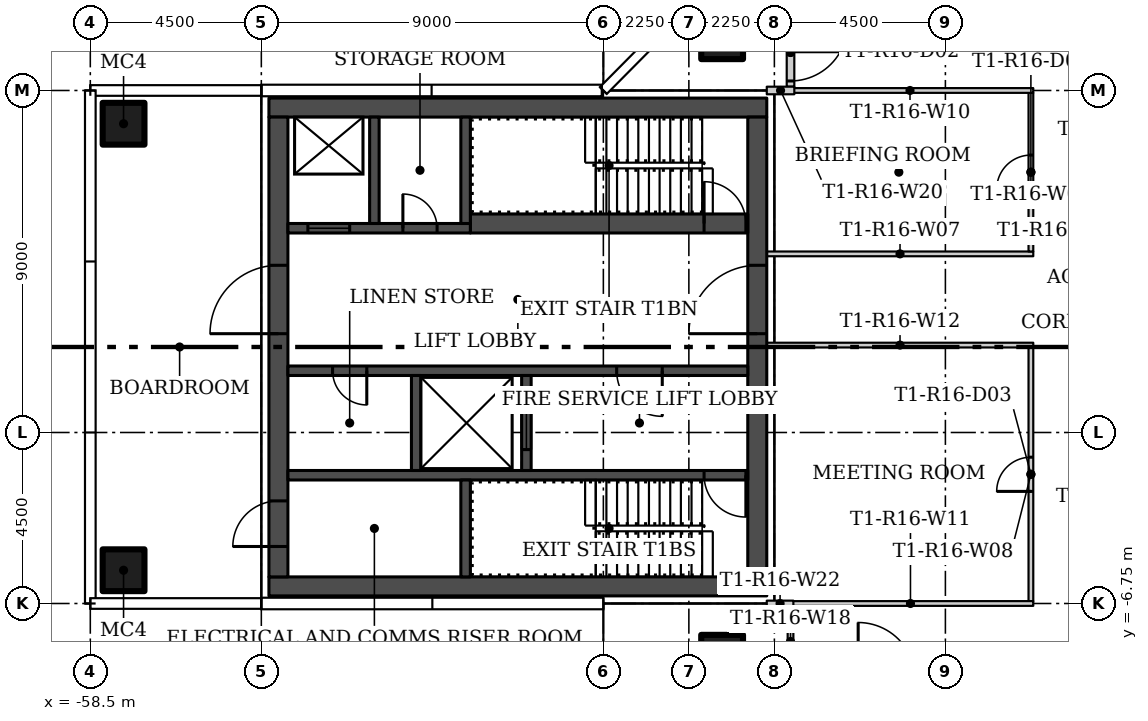
"""IFC4 building model, lengths in metres.
Left out: names, types, materials, properties, quantities, classifications, styles, units other than length and angle.
Written with IfcOpenShell. Run it as: python <this file> out.ifc"""

import sys

from ifc_helpers import new_model, si_unit, direction, frame, frame_2d, origin, origin_2d, place, context, subcontext, project, spatial, rectangle, hollow_rectangle, extrude, element, fill, save


model = new_model("IFC4")
c1 = context("Model", 3, precision=1e-05, world=origin(), true_north=direction((0.0, 1.0)))
c2 = subcontext(c1, "Body", "Model", "MODEL_VIEW")
j1 = project(units=[si_unit("LENGTHUNIT", "METRE"), si_unit("PLANEANGLEUNIT", "RADIAN")], contexts=[c1])
p1 = place(None, origin())
s1 = spatial("IfcSite", under=j1, at=p1, CompositionType="ELEMENT")
p2 = place(p1, origin())
s2 = spatial("IfcBuilding", under=s1, at=p2, CompositionType="ELEMENT")
p3 = place(p2, frame((0.0, 0.0, 146.7)))
s3 = spatial("IfcBuildingStorey", under=s2, at=p3, CompositionType="ELEMENT", Elevation=146.7)
for number, where in (
    (1, (-41.875, 8.125, 0.0)),
    (2, (-41.875, -8.125, 0.0)),
    (3, (-57.625, -5.875, 0.0)),
    (4, (-57.625, 5.875, 0.0)),
):
    element("IfcColumn", number, at=place(p3, frame(where)), inside=s3, PredefinedType="COLUMN", context=c2, shape_type="SweptSolid", body=[
        extrude(hollow_rectangle(XDim=1.1, YDim=1.1, WallThickness=0.04, at=origin_2d()), origin(), (0.0, 0.0, 1.0), 3.55),
    ])
p4 = place(p3, frame((-40.7, 2.45, 0.0)))
e5 = element("IfcWall", 5, at=p4, inside=s3, PredefinedType="PARTITIONING", context=c2, shape_type="SweptSolid", body=[
    extrude(rectangle(XDim=7.012, YDim=0.125, at=frame_2d((3.506, 0.0))), origin(), (0.0, 0.0, 1.0), 3.55),
])
p5 = place(p3, frame((-33.75, -6.688, 0.0), z_axis=(0.0, 0.0, 1.0), x_axis=(0.0, 1.0, 0.0)))
e6 = element("IfcWall", 6, at=p5, inside=s3, PredefinedType="PARTITIONING", context=c2, shape_type="SweptSolid", body=[
    extrude(rectangle(XDim=6.675, YDim=0.125, at=frame_2d((3.337, 0.0))), origin(), (0.0, 0.0, 1.0), 3.55),
])
p6 = place(p5, frame((2.887, 0.0, 0.0)))
e7 = element("IfcOpeningElement", 7, at=p6, cuts=e6, PredefinedType="OPENING", context=c2, shape_type="SweptSolid", body=[
    extrude(rectangle(XDim=0.9, YDim=2.1, at=frame_2d((0.45, 1.05))), frame((0.0, 0.073, 0.0), z_axis=(0.0, -1.0, 0.0), x_axis=(1.0, 0.0, 0.0)), (0.0, 0.0, 1.0), 0.145),
])
p7 = place(p3, frame((-33.75, 2.513, 0.0), z_axis=(0.0, 0.0, 1.0), x_axis=(0.0, 1.0, 0.0)))
e8 = element("IfcWall", 8, at=p7, inside=s3, PredefinedType="PARTITIONING", context=c2, shape_type="SweptSolid", body=[
    extrude(rectangle(XDim=4.175, YDim=0.125, at=frame_2d((2.087, 0.0))), origin(), (0.0, 0.0, 1.0), 3.55),
])
p8 = place(p7, frame((1.637, 0.0, 0.0)))
e9 = element("IfcOpeningElement", 9, at=p8, cuts=e8, PredefinedType="OPENING", context=c2, shape_type="SweptSolid", body=[
    extrude(rectangle(XDim=0.9, YDim=2.1, at=frame_2d((0.45, 1.05))), frame((0.0, 0.073, 0.0), z_axis=(0.0, -1.0, 0.0), x_axis=(1.0, 0.0, 0.0)), (0.0, 0.0, 1.0), 0.145),
])
p9 = place(p3, frame((-33.688, 6.75, 0.0), z_axis=(0.0, 0.0, 1.0), x_axis=(-1.0, 0.0, 0.0)))
e10 = element("IfcWall", 10, at=p9, inside=s3, PredefinedType="PARTITIONING", context=c2, shape_type="SweptSolid", body=[
    extrude(rectangle(XDim=6.488, YDim=0.125, at=frame_2d((3.244, 0.0))), origin(), (0.0, 0.0, 1.0), 3.55),
])
p10 = place(p3, frame((-40.15, -6.75, 0.0)))
e11 = element("IfcWall", 11, at=p10, inside=s3, PredefinedType="PARTITIONING", context=c2, shape_type="SweptSolid", body=[
    extrude(rectangle(XDim=6.463, YDim=0.125, at=frame_2d((3.231, 0.0))), origin(), (0.0, 0.0, 1.0), 3.55),
])
p11 = place(p3, frame((-33.688, 0.05, 0.0), z_axis=(0.0, 0.0, 1.0), x_axis=(-1.0, 0.0, 0.0)))
e12 = element("IfcWall", 12, at=p11, inside=s3, PredefinedType="PARTITIONING", context=c2, shape_type="SweptSolid", body=[
    extrude(rectangle(XDim=7.012, YDim=0.125, at=frame_2d((3.506, 0.0))), origin(), (0.0, 0.0, 1.0), 3.55),
])
p12 = place(p3, frame((-40.075, 8.65, 0.0), z_axis=(0.0, 0.0, 1.0), x_axis=(0.0, -1.0, 0.0)))
e13 = element("IfcWall", 13, at=p12, inside=s3, PredefinedType="PARTITIONING", context=c2, shape_type="SweptSolid", body=[
    extrude(rectangle(XDim=1.8, YDim=0.2, at=frame_2d((0.9, 0.0))), origin(), (0.0, 0.0, 1.0), 3.55),
])
p13 = place(p12, frame((0.15, 0.0, 0.0)))
e14 = element("IfcOpeningElement", 14, at=p13, cuts=e13, PredefinedType="OPENING", context=c2, shape_type="SweptSolid", body=[
    extrude(rectangle(XDim=1.5, YDim=2.4, at=frame_2d((0.75, 1.2))), frame((0.0, 0.11, 0.0), z_axis=(0.0, -1.0, 0.0), x_axis=(1.0, 0.0, 0.0)), (0.0, 0.0, 1.0), 0.22),
])
p14 = place(p3, frame((-40.075, -6.825, 0.0), z_axis=(0.0, 0.0, 1.0), x_axis=(0.0, -1.0, 0.0)))
e15 = element("IfcWall", 15, at=p14, inside=s3, PredefinedType="PARTITIONING", context=c2, shape_type="SweptSolid", body=[
    extrude(rectangle(XDim=1.85, YDim=0.15, at=frame_2d((0.925, 0.0))), origin(), (0.0, 0.0, 1.0), 3.55),
])
p15 = place(p3, frame((-39.975, 6.75, 0.0), z_axis=(0.0, 0.0, 1.0), x_axis=(-1.0, 0.0, 0.0)))
e16 = element("IfcWall", 16, at=p15, inside=s3, PredefinedType="PARTITIONING", context=c2, shape_type="SweptSolid", body=[
    extrude(rectangle(XDim=0.725, YDim=0.2, at=frame_2d((0.362, 0.0))), origin(), (0.0, 0.0, 1.0), 3.55),
])
p16 = place(p3, frame((-40.7, -6.75, 0.0)))
e17 = element("IfcWall", 17, at=p16, inside=s3, PredefinedType="PARTITIONING", context=c2, shape_type="SweptSolid", body=[
    extrude(rectangle(XDim=0.7, YDim=0.15, at=frame_2d((0.35, 0.0))), origin(), (0.0, 0.0, 1.0), 3.55),
])
for number, where, z_axis, x_axis in (
    (18, (-40.7, -6.3, 0.0), (0.0, 0.0, 1.0), (-1.0, 0.0, 0.0)),
    (19, (-40.7, 6.3, 0.0), (0.0, 0.0, 1.0), (-1.0, 0.0, 0.0)),
):
    element("IfcWall", number, at=place(p3, frame(where, z_axis=z_axis, x_axis=x_axis)), inside=s3, PredefinedType="SHEAR", context=c2, shape_type="SweptSolid", body=[
        extrude(rectangle(XDim=13.1, YDim=0.5, at=frame_2d((6.55, 0.0))), origin(), (0.0, 0.0, 1.0), 3.55),
    ])
p17 = place(p3, frame((-40.95, -6.05, 0.0), z_axis=(0.0, 0.0, 1.0), x_axis=(0.0, 1.0, 0.0)))
e20 = element("IfcWall", 20, at=p17, inside=s3, PredefinedType="SHEAR", context=c2, shape_type="SweptSolid", body=[
    extrude(rectangle(XDim=12.1, YDim=0.5, at=frame_2d((6.05, 0.0))), origin(), (0.0, 0.0, 1.0), 3.55),
])
p18 = place(p17, frame((6.4, 0.0, 0.0)))
e21 = element("IfcOpeningElement", 21, at=p18, cuts=e20, PredefinedType="OPENING", context=c2, shape_type="SweptSolid", body=[
    extrude(rectangle(XDim=1.8, YDim=2.4, at=frame_2d((0.9, 1.2))), frame((0.0, 0.26, 0.0), z_axis=(0.0, -1.0, 0.0), x_axis=(1.0, 0.0, 0.0)), (0.0, 0.0, 1.0), 0.52),
])
p19 = place(p3, frame((-53.55, -6.05, 0.0), z_axis=(0.0, 0.0, 1.0), x_axis=(0.0, 1.0, 0.0)))
e22 = element("IfcWall", 22, at=p19, inside=s3, PredefinedType="SHEAR", context=c2, shape_type="SweptSolid", body=[
    extrude(rectangle(XDim=12.1, YDim=0.5, at=frame_2d((6.05, 0.0))), origin(), (0.0, 0.0, 1.0), 3.55),
])
p20 = place(p19, frame((0.8, 0.0, 0.0)))
e23 = element("IfcOpeningElement", 23, at=p20, cuts=e22, PredefinedType="OPENING", context=c2, shape_type="SweptSolid", body=[
    extrude(rectangle(XDim=1.2, YDim=2.1, at=frame_2d((0.6, 1.05))), frame((0.0, 0.26, 0.0), z_axis=(0.0, -1.0, 0.0), x_axis=(1.0, 0.0, 0.0)), (0.0, 0.0, 1.0), 0.52),
])
p21 = place(p19, frame((6.4, 0.0, 0.0)))
e24 = element("IfcOpeningElement", 24, at=p21, cuts=e22, PredefinedType="OPENING", context=c2, shape_type="SweptSolid", body=[
    extrude(rectangle(XDim=1.8, YDim=2.4, at=frame_2d((0.9, 1.2))), frame((0.0, 0.26, 0.0), z_axis=(0.0, -1.0, 0.0), x_axis=(1.0, 0.0, 0.0)), (0.0, 0.0, 1.0), 0.52),
])
p22 = place(p3, frame((-41.2, -3.375, 0.0), z_axis=(0.0, 0.0, 1.0), x_axis=(-1.0, 0.0, 0.0)))
e25 = element("IfcWall", 25, at=p22, inside=s3, PredefinedType="SHEAR", context=c2, shape_type="SweptSolid", body=[
    extrude(rectangle(XDim=12.1, YDim=0.25, at=frame_2d((6.05, 0.0))), origin(), (0.0, 0.0, 1.0), 3.55),
])
p23 = place(p22, frame((0.05, 0.0, 0.0)))
e26 = element("IfcOpeningElement", 26, at=p23, cuts=e25, PredefinedType="OPENING", context=c2, shape_type="SweptSolid", body=[
    extrude(rectangle(XDim=1.1, YDim=2.1, at=frame_2d((0.55, 1.05))), frame((0.0, 0.135, 0.0), z_axis=(0.0, -1.0, 0.0), x_axis=(1.0, 0.0, 0.0)), (0.0, 0.0, 1.0), 0.27),
])
p24 = place(p3, frame((-48.625, -6.05, 0.0), z_axis=(0.0, 0.0, 1.0), x_axis=(0.0, 1.0, 0.0)))
e27 = element("IfcWall", 27, at=p24, inside=s3, PredefinedType="SHEAR", context=c2, shape_type="SweptSolid", body=[
    extrude(rectangle(XDim=2.55, YDim=0.25, at=frame_2d((1.275, 0.0))), origin(), (0.0, 0.0, 1.0), 3.55),
])
p25 = place(p3, frame((-41.2, -0.625, 0.0), z_axis=(0.0, 0.0, 1.0), x_axis=(-1.0, 0.0, 0.0)))
e28 = element("IfcWall", 28, at=p25, inside=s3, PredefinedType="SHEAR", context=c2, shape_type="SweptSolid", body=[
    extrude(rectangle(XDim=12.1, YDim=0.25, at=frame_2d((6.05, 0.0))), origin(), (0.0, 0.0, 1.0), 3.55),
])
p26 = place(p25, frame((2.25, 0.0, 0.0)))
e29 = element("IfcOpeningElement", 29, at=p26, cuts=e28, PredefinedType="OPENING", context=c2, shape_type="SweptSolid", body=[
    extrude(rectangle(XDim=1.2, YDim=2.1, at=frame_2d((0.6, 1.05))), frame((0.0, 0.135, 0.0), z_axis=(0.0, -1.0, 0.0), x_axis=(1.0, 0.0, 0.0)), (0.0, 0.0, 1.0), 0.27),
])
p27 = place(p25, frame((10.025, 0.0, 0.0)))
e30 = element("IfcOpeningElement", 30, at=p27, cuts=e28, PredefinedType="OPENING", context=c2, shape_type="SweptSolid", body=[
    extrude(rectangle(XDim=0.9, YDim=2.1, at=frame_2d((0.45, 1.05))), frame((0.0, 0.135, 0.0), z_axis=(0.0, -1.0, 0.0), x_axis=(1.0, 0.0, 0.0)), (0.0, 0.0, 1.0), 0.27),
])
p28 = place(p3, frame((-47.025, -3.25, 0.0), z_axis=(0.0, 0.0, 1.0), x_axis=(0.0, 1.0, 0.0)))
e31 = element("IfcWall", 31, at=p28, inside=s3, PredefinedType="SHEAR", context=c2, shape_type="SweptSolid", body=[
    extrude(rectangle(XDim=2.5, YDim=0.25, at=frame_2d((1.25, 0.0))), origin(), (0.0, 0.0, 1.0), 3.55),
])
p29 = place(p28, frame((0.55, 0.0, 0.0)))
e32 = element("IfcOpeningElement", 32, at=p29, cuts=e31, PredefinedType="OPENING", context=c2, shape_type="SweptSolid", body=[
    extrude(rectangle(XDim=1.4, YDim=2.4, at=frame_2d((0.7, 1.2))), frame((0.0, 0.135, 0.0), z_axis=(0.0, -1.0, 0.0), x_axis=(1.0, 0.0, 0.0)), (0.0, 0.0, 1.0), 0.27),
])
p30 = place(p3, frame((-49.925, -3.25, 0.0), z_axis=(0.0, 0.0, 1.0), x_axis=(0.0, 1.0, 0.0)))
e33 = element("IfcWall", 33, at=p30, inside=s3, PredefinedType="SHEAR", context=c2, shape_type="SweptSolid", body=[
    extrude(rectangle(XDim=2.5, YDim=0.25, at=frame_2d((1.25, 0.0))), origin(), (0.0, 0.0, 1.0), 3.55),
])
p31 = place(p3, frame((-48.5, 3.25, 0.0)))
e34 = element("IfcWall", 34, at=p31, inside=s3, PredefinedType="SHEAR", context=c2, shape_type="SweptSolid", body=[
    extrude(rectangle(XDim=7.3, YDim=0.5, at=frame_2d((3.65, 0.0))), origin(), (0.0, 0.0, 1.0), 3.55),
])
p32 = place(p31, frame((6.15, 0.0, 0.0)))
e35 = element("IfcOpeningElement", 35, at=p32, cuts=e34, PredefinedType="OPENING", context=c2, shape_type="SweptSolid", body=[
    extrude(rectangle(XDim=1.1, YDim=2.1, at=frame_2d((0.55, 1.05))), frame((0.0, 0.26, 0.0), z_axis=(0.0, -1.0, 0.0), x_axis=(1.0, 0.0, 0.0)), (0.0, 0.0, 1.0), 0.52),
])
p33 = place(p3, frame((-53.3, 3.125, 0.0)))
e36 = element("IfcWall", 36, at=p33, inside=s3, PredefinedType="SHEAR", context=c2, shape_type="SweptSolid", body=[
    extrude(rectangle(XDim=4.8, YDim=0.25, at=frame_2d((2.4, 0.0))), origin(), (0.0, 0.0, 1.0), 3.55),
])
p34 = place(p33, frame((0.525, 0.0, 0.0)))
e37 = element("IfcOpeningElement", 37, at=p34, cuts=e36, PredefinedType="OPENING", context=c2, shape_type="SweptSolid", body=[
    extrude(rectangle(XDim=1.1, YDim=2.1, at=frame_2d((0.55, 1.05))), frame((0.0, 0.135, 0.0), z_axis=(0.0, -1.0, 0.0), x_axis=(1.0, 0.0, 0.0)), (0.0, 0.0, 1.0), 0.27),
])
p35 = place(p33, frame((3.025, 0.0, 0.0)))
e38 = element("IfcOpeningElement", 38, at=p35, cuts=e36, PredefinedType="OPENING", context=c2, shape_type="SweptSolid", body=[
    extrude(rectangle(XDim=0.9, YDim=2.1, at=frame_2d((0.45, 1.05))), frame((0.0, 0.135, 0.0), z_axis=(0.0, -1.0, 0.0), x_axis=(1.0, 0.0, 0.0)), (0.0, 0.0, 1.0), 0.27),
])
for number, where, z_axis, x_axis in (
    (39, (-48.625, 3.25, 0.0), (0.0, 0.0, 1.0), (0.0, 1.0, 0.0)),
    (40, (-51.025, 3.25, 0.0), (0.0, 0.0, 1.0), (0.0, 1.0, 0.0)),
):
    element("IfcWall", number, at=place(p3, frame(where, z_axis=z_axis, x_axis=x_axis)), inside=s3, PredefinedType="SHEAR", context=c2, shape_type="SweptSolid", body=[
        extrude(rectangle(XDim=2.8, YDim=0.25, at=frame_2d((1.4, 0.0))), origin(), (0.0, 0.0, 1.0), 3.55),
    ])
p36 = place(p13, origin())
e41 = element("IfcDoor", 41, at=p36, inside=s3, OperationType="DOUBLE_DOOR_SINGLE_SWING", PredefinedType="DOOR", context=c2, shape_type="SweptSolid", body=[
    extrude(rectangle(XDim=1.5, YDim=2.4, at=frame_2d((0.75, 1.2))), frame((0.0, 0.025, 0.0), z_axis=(0.0, -1.0, 0.0), x_axis=(1.0, 0.0, 0.0)), (0.0, 0.0, 1.0), 0.05),
])
fill(e14, e41)
p37 = place(p6, origin())
e42 = element("IfcDoor", 42, at=p37, inside=s3, OperationType="SINGLE_SWING_RIGHT", PredefinedType="DOOR", context=c2, shape_type="SweptSolid", body=[
    extrude(rectangle(XDim=0.9, YDim=2.1, at=frame_2d((0.45, 1.05))), frame((0.0, 0.025, 0.0), z_axis=(0.0, -1.0, 0.0), x_axis=(1.0, 0.0, 0.0)), (0.0, 0.0, 1.0), 0.05),
])
fill(e7, e42)
p38 = place(p8, origin())
e43 = element("IfcDoor", 43, at=p38, inside=s3, OperationType="SINGLE_SWING_RIGHT", PredefinedType="DOOR", context=c2, shape_type="SweptSolid", body=[
    extrude(rectangle(XDim=0.9, YDim=2.1, at=frame_2d((0.45, 1.05))), frame((0.0, 0.025, 0.0), z_axis=(0.0, -1.0, 0.0), x_axis=(1.0, 0.0, 0.0)), (0.0, 0.0, 1.0), 0.05),
])
fill(e9, e43)
p39 = place(p18, origin())
e44 = element("IfcDoor", 44, at=p39, inside=s3, OperationType="DOUBLE_DOOR_SINGLE_SWING", PredefinedType="DOOR", context=c2, shape_type="SweptSolid", body=[
    extrude(rectangle(XDim=1.8, YDim=2.4, at=frame_2d((0.9, 1.2))), frame((0.0, 0.025, 0.0), z_axis=(0.0, -1.0, 0.0), x_axis=(1.0, 0.0, 0.0)), (0.0, 0.0, 1.0), 0.05),
])
fill(e21, e44)
p40 = place(p20, origin())
e45 = element("IfcDoor", 45, at=p40, inside=s3, OperationType="SINGLE_SWING_LEFT", PredefinedType="DOOR", context=c2, shape_type="SweptSolid", body=[
    extrude(rectangle(XDim=1.2, YDim=2.1, at=frame_2d((0.6, 1.05))), frame((0.0, 0.025, 0.0), z_axis=(0.0, -1.0, 0.0), x_axis=(1.0, 0.0, 0.0)), (0.0, 0.0, 1.0), 0.05),
])
fill(e23, e45)
p41 = place(p21, origin())
e46 = element("IfcDoor", 46, at=p41, inside=s3, OperationType="DOUBLE_DOOR_SINGLE_SWING", PredefinedType="DOOR", context=c2, shape_type="SweptSolid", body=[
    extrude(rectangle(XDim=1.8, YDim=2.4, at=frame_2d((0.9, 1.2))), frame((0.0, 0.025, 0.0), z_axis=(0.0, -1.0, 0.0), x_axis=(1.0, 0.0, 0.0)), (0.0, 0.0, 1.0), 0.05),
])
fill(e24, e46)
p42 = place(p23, origin())
e47 = element("IfcDoor", 47, at=p42, inside=s3, OperationType="SINGLE_SWING_LEFT", PredefinedType="DOOR", context=c2, shape_type="SweptSolid", body=[
    extrude(rectangle(XDim=1.1, YDim=2.1, at=frame_2d((0.55, 1.05))), frame((0.0, 0.025, 0.0), z_axis=(0.0, -1.0, 0.0), x_axis=(1.0, 0.0, 0.0)), (0.0, 0.0, 1.0), 0.05),
])
fill(e26, e47)
p43 = place(p26, origin())
e48 = element("IfcDoor", 48, at=p43, inside=s3, OperationType="SINGLE_SWING_LEFT", PredefinedType="DOOR", context=c2, shape_type="SweptSolid", body=[
    extrude(rectangle(XDim=1.2, YDim=2.1, at=frame_2d((0.6, 1.05))), frame((0.0, 0.025, 0.0), z_axis=(0.0, -1.0, 0.0), x_axis=(1.0, 0.0, 0.0)), (0.0, 0.0, 1.0), 0.05),
])
fill(e29, e48)
p44 = place(p27, origin())
e49 = element("IfcDoor", 49, at=p44, inside=s3, OperationType="SINGLE_SWING_RIGHT", PredefinedType="DOOR", context=c2, shape_type="SweptSolid", body=[
    extrude(rectangle(XDim=0.9, YDim=2.1, at=frame_2d((0.45, 1.05))), frame((0.0, 0.025, 0.0), z_axis=(0.0, -1.0, 0.0), x_axis=(1.0, 0.0, 0.0)), (0.0, 0.0, 1.0), 0.05),
])
fill(e30, e49)
p45 = place(p29, origin())
e50 = element("IfcDoor", 50, at=p45, inside=s3, OperationType="SLIDING_TO_LEFT", PredefinedType="DOOR", context=c2, shape_type="SweptSolid", body=[
    extrude(rectangle(XDim=1.4, YDim=2.4, at=frame_2d((0.7, 1.2))), frame((0.0, 0.025, 0.0), z_axis=(0.0, -1.0, 0.0), x_axis=(1.0, 0.0, 0.0)), (0.0, 0.0, 1.0), 0.05),
])
fill(e32, e50)
p46 = place(p32, origin())
e51 = element("IfcDoor", 51, at=p46, inside=s3, OperationType="SINGLE_SWING_RIGHT", PredefinedType="DOOR", context=c2, shape_type="SweptSolid", body=[
    extrude(rectangle(XDim=1.1, YDim=2.1, at=frame_2d((0.55, 1.05))), frame((0.0, 0.025, 0.0), z_axis=(0.0, -1.0, 0.0), x_axis=(1.0, 0.0, 0.0)), (0.0, 0.0, 1.0), 0.05),
])
fill(e35, e51)
p47 = place(p34, origin())
e52 = element("IfcDoor", 52, at=p47, inside=s3, OperationType="SLIDING_TO_LEFT", PredefinedType="DOOR", context=c2, shape_type="SweptSolid", body=[
    extrude(rectangle(XDim=1.1, YDim=2.1, at=frame_2d((0.55, 1.05))), frame((0.0, 0.025, 0.0), z_axis=(0.0, -1.0, 0.0), x_axis=(1.0, 0.0, 0.0)), (0.0, 0.0, 1.0), 0.05),
])
fill(e37, e52)
p48 = place(p35, origin())
e53 = element("IfcDoor", 53, at=p48, inside=s3, OperationType="SINGLE_SWING_RIGHT", PredefinedType="DOOR", context=c2, shape_type="SweptSolid", body=[
    extrude(rectangle(XDim=0.9, YDim=2.1, at=frame_2d((0.45, 1.05))), frame((0.0, 0.025, 0.0), z_axis=(0.0, -1.0, 0.0), x_axis=(1.0, 0.0, 0.0)), (0.0, 0.0, 1.0), 0.05),
])
fill(e38, e53)
save(model, sys.argv[1])
